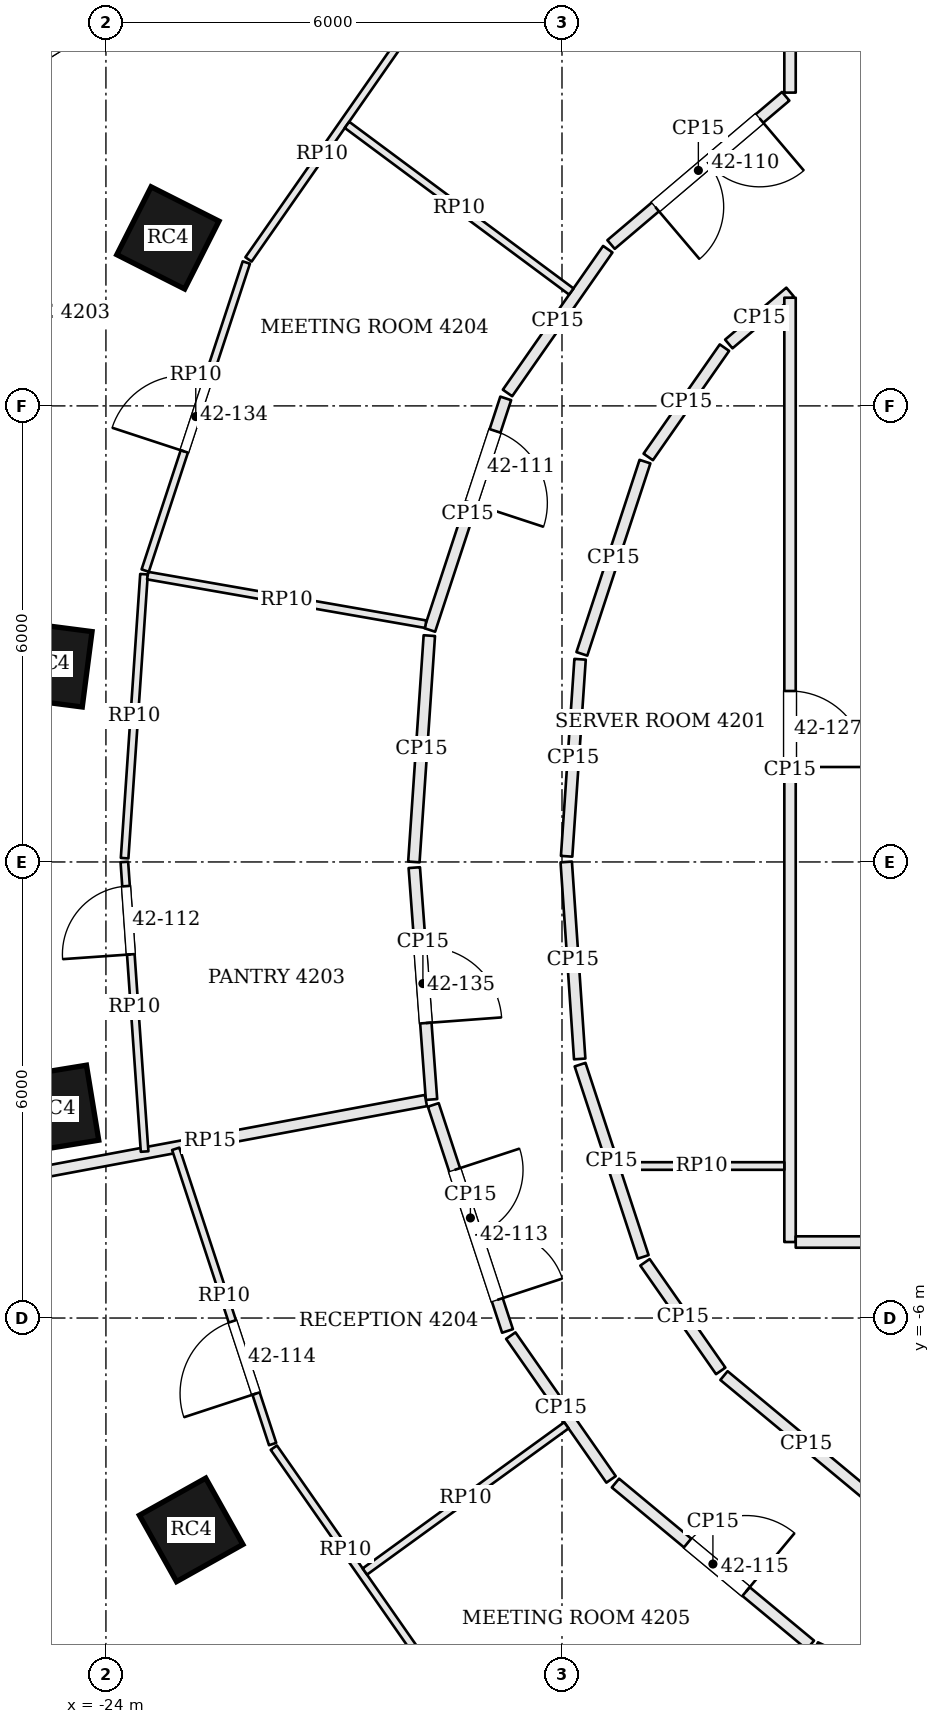
"""IFC4 building model, lengths in metres.
Left out: names, types, materials, properties, quantities, classifications, styles, units other than length and angle.
Written with IfcOpenShell. Run it as: python <this file> out.ifc"""

import sys

from ifc_helpers import new_model, si_unit, direction, frame, frame_2d, origin, origin_2d, place, context, subcontext, project, spatial, rectangle, extrude, element, fill, save


model = new_model("IFC4")
c1 = context("Model", 3, precision=1e-05, world=origin(), true_north=direction((0.0, 1.0)))
c2 = subcontext(c1, "Body", "Model", "MODEL_VIEW")
j1 = project(units=[si_unit("LENGTHUNIT", "METRE"), si_unit("PLANEANGLEUNIT", "RADIAN")], contexts=[c1])
p1 = place(None, origin())
s1 = spatial("IfcSite", under=j1, at=p1, CompositionType="ELEMENT")
p2 = place(p1, origin())
s2 = spatial("IfcBuilding", under=s1, at=p2, CompositionType="ELEMENT")
p3 = place(p2, frame((0.0, 0.0, 174.0)))
s3 = spatial("IfcBuildingStorey", under=s2, at=p3, CompositionType="ELEMENT", Elevation=174.0)
for number, where, z_axis, x_axis in (
    (1, (-23.185, 8.21, -0.7), (0.0, 0.0, 1.0), (-0.451, -0.893, 0.0)),
    (2, (-24.743, 2.599, -0.7), (0.0, 0.0, 1.0), (-0.128, -0.992, 0.0)),
    (3, (-24.669, -3.248, -0.7), (0.0, 0.0, 1.0), (0.162, -0.987, 0.0)),
    (4, (-22.879, -8.787, -0.7), (0.0, 0.0, 1.0), (0.489, -0.873, 0.0)),
):
    element("IfcColumn", number, at=place(p3, frame(where, z_axis=z_axis, x_axis=x_axis)), inside=s3, PredefinedType="COLUMN", context=c2, shape_type="SweptSolid", body=[
        extrude(rectangle(XDim=1.0, YDim=1.0, at=origin_2d()), origin(), (0.0, 0.0, 1.0), 4.6),
    ])
p4 = place(p3, frame((-23.368, 11.701, 0.0), z_axis=(0.0, 0.0, 1.0), x_axis=(-0.850251408633, -0.526376806211, 0.0)))
e5 = element("IfcWall", 5, at=p4, inside=s3, PredefinedType="SOLIDWALL", context=c2, shape_type="SweptSolid", body=[
    extrude(rectangle(XDim=5.302, YDim=0.45, at=frame_2d((2.651, 0.0))), origin(), (0.0, 0.0, 1.0), 3.7),
])
p5 = place(p4, frame((1.601, 0.0, 0.9)))
e6 = element("IfcOpeningElement", 6, at=p5, cuts=e5, PredefinedType="OPENING", context=c2, shape_type="SweptSolid", body=[
    extrude(rectangle(XDim=2.1, YDim=2.3, at=frame_2d((1.05, 1.15))), frame((0.0, 0.235, 0.0), z_axis=(0.0, -1.0, 0.0), x_axis=(1.0, 0.0, 0.0)), (0.0, 0.0, 1.0), 0.47),
])
p6 = place(p3, frame((-15.0, 13.099, 0.0), z_axis=(0.0, 0.0, 1.0), x_axis=(0.0, -1.0, 0.0)))
e7 = element("IfcWall", 7, at=p6, inside=s3, PredefinedType="PARTITIONING", context=c2, shape_type="SweptSolid", body=[
    extrude(rectangle(XDim=2.977, YDim=0.15, at=frame_2d((1.489, 0.0))), origin(), (0.0, 0.0, 1.0), 3.084),
])
p7 = place(p3, frame((-15.057, 10.073, 0.0), z_axis=(0.0, 0.0, 1.0), x_axis=(-0.762398905861, -0.647107339119, 0.0)))
e8 = element("IfcWall", 8, at=p7, inside=s3, PredefinedType="PARTITIONING", context=c2, shape_type="SweptSolid", body=[
    extrude(rectangle(XDim=3.013, YDim=0.15, at=frame_2d((1.507, 0.0))), origin(), (0.0, 0.0, 1.0), 3.084),
])
p8 = place(p7, frame((0.45, 0.0, 0.0)))
e9 = element("IfcOpeningElement", 9, at=p8, cuts=e8, PredefinedType="OPENING", context=c2, shape_type="SweptSolid", body=[
    extrude(rectangle(XDim=1.8, YDim=2.1, at=frame_2d((0.9, 1.05))), frame((0.0, 0.085, 0.0), z_axis=(0.0, -1.0, 0.0), x_axis=(1.0, 0.0, 0.0)), (0.0, 0.0, 1.0), 0.17),
])
p9 = place(p3, frame((-17.397, 8.062, 0.0), z_axis=(0.0, 0.0, 1.0), x_axis=(-0.572118665737, -0.820170855563, 0.0)))
e10 = element("IfcWall", 10, at=p9, inside=s3, PredefinedType="PARTITIONING", context=c2, shape_type="SweptSolid", body=[
    extrude(rectangle(XDim=2.306, YDim=0.15, at=frame_2d((1.153, 0.0))), origin(), (0.0, 0.0, 1.0), 3.084),
])
p10 = place(p3, frame((-18.74, 6.099, 0.0), z_axis=(0.0, 0.0, 1.0), x_axis=(-0.31188427026, -0.950120098706, 0.0)))
e11 = element("IfcWall", 11, at=p10, inside=s3, PredefinedType="PARTITIONING", context=c2, shape_type="SweptSolid", body=[
    extrude(rectangle(XDim=3.206, YDim=0.15, at=frame_2d((1.603, 0.0))), origin(), (0.0, 0.0, 1.0), 3.084),
])
p11 = place(p10, frame((0.45, 0.0, 0.0)))
e12 = element("IfcOpeningElement", 12, at=p11, cuts=e11, PredefinedType="OPENING", context=c2, shape_type="SweptSolid", body=[
    extrude(rectangle(XDim=1.0, YDim=2.4, at=frame_2d((0.5, 1.2))), frame((0.0, 0.085, 0.0), z_axis=(0.0, -1.0, 0.0), x_axis=(1.0, 0.0, 0.0)), (0.0, 0.0, 1.0), 0.17),
])
p12 = place(p3, frame((-19.745, 2.978, 0.0), z_axis=(0.0, 0.0, 1.0), x_axis=(-0.068142324, -0.997675610447, 0.0)))
e13 = element("IfcWall", 13, at=p12, inside=s3, PredefinedType="PARTITIONING", context=c2, shape_type="SweptSolid", body=[
    extrude(rectangle(XDim=2.984, YDim=0.15, at=frame_2d((1.492, 0.0))), origin(), (0.0, 0.0, 1.0), 3.084),
])
p13 = place(p3, frame((-19.943, -0.075, 0.0), z_axis=(0.0, 0.0, 1.0), x_axis=(0.074071611523, -0.997252924973, 0.0)))
e14 = element("IfcWall", 14, at=p13, inside=s3, PredefinedType="PARTITIONING", context=c2, shape_type="SweptSolid", body=[
    extrude(rectangle(XDim=3.059, YDim=0.15, at=frame_2d((1.529, 0.0))), origin(), (0.0, 0.0, 1.0), 3.084),
])
p14 = place(p13, frame((1.05, 0.0, 0.0)))
e15 = element("IfcOpeningElement", 15, at=p14, cuts=e14, PredefinedType="OPENING", context=c2, shape_type="SweptSolid", body=[
    extrude(rectangle(XDim=1.0, YDim=2.1, at=frame_2d((0.5, 1.05))), frame((0.0, 0.085, 0.0), z_axis=(0.0, -1.0, 0.0), x_axis=(1.0, 0.0, 0.0)), (0.0, 0.0, 1.0), 0.17),
])
p15 = place(p3, frame((-25.467, -4.199, 0.0), z_axis=(0.0, 0.0, 1.0), x_axis=(0.982998787258, 0.183612048216, 0.0)))
e16 = element("IfcWall", 16, at=p15, inside=s3, PredefinedType="PARTITIONING", context=c2, shape_type="SweptSolid", body=[
    extrude(rectangle(XDim=5.775, YDim=0.15, at=frame_2d((2.887, 0.0))), origin(), (0.0, 0.0, 1.0), 3.234),
])
p16 = place(p3, frame((-19.693, -3.196, 0.0), z_axis=(0.0, 0.0, 1.0), x_axis=(0.311918951318, -0.950108713679, 0.0)))
e17 = element("IfcWall", 17, at=p16, inside=s3, PredefinedType="PARTITIONING", context=c2, shape_type="SweptSolid", body=[
    extrude(rectangle(XDim=3.13, YDim=0.15, at=frame_2d((1.565, 0.0))), origin(), (0.0, 0.0, 1.0), 3.084),
])
p17 = place(p16, frame((0.9, 0.0, 0.0)))
e18 = element("IfcOpeningElement", 18, at=p17, cuts=e17, PredefinedType="OPENING", context=c2, shape_type="SweptSolid", body=[
    extrude(rectangle(XDim=1.8, YDim=2.1, at=frame_2d((0.9, 1.05))), frame((0.0, 0.085, 0.0), z_axis=(0.0, -1.0, 0.0), x_axis=(1.0, 0.0, 0.0)), (0.0, 0.0, 1.0), 0.17),
])
p18 = place(p3, frame((-18.674, -6.232, 0.0), z_axis=(0.0, 0.0, 1.0), x_axis=(0.572118665737, -0.820170855563, 0.0)))
e19 = element("IfcWall", 19, at=p18, inside=s3, PredefinedType="PARTITIONING", context=c2, shape_type="SweptSolid", body=[
    extrude(rectangle(XDim=2.306, YDim=0.15, at=frame_2d((1.153, 0.0))), origin(), (0.0, 0.0, 1.0), 3.084),
])
p19 = place(p3, frame((-17.297, -8.171, 0.0), z_axis=(0.0, 0.0, 1.0), x_axis=(0.769228575061, -0.638973707839, 0.0)))
e20 = element("IfcWall", 20, at=p19, inside=s3, PredefinedType="PARTITIONING", context=c2, shape_type="SweptSolid", body=[
    extrude(rectangle(XDim=3.334, YDim=0.15, at=frame_2d((1.667, 0.0))), origin(), (0.0, 0.0, 1.0), 3.084),
])
p20 = place(p19, frame((1.234, 0.0, 0.0)))
e21 = element("IfcOpeningElement", 21, at=p20, cuts=e20, PredefinedType="OPENING", context=c2, shape_type="SweptSolid", body=[
    extrude(rectangle(XDim=1.0, YDim=2.4, at=frame_2d((0.5, 1.2))), frame((0.0, 0.085, 0.0), z_axis=(0.0, -1.0, 0.0), x_axis=(1.0, 0.0, 0.0)), (0.0, 0.0, 1.0), 0.17),
])
p21 = place(p3, frame((-14.664, -10.334, 0.0), z_axis=(0.0, 0.0, 1.0), x_axis=(0.901507315282, -0.432763862278, 0.0)))
e22 = element("IfcWall", 22, at=p21, inside=s3, PredefinedType="PARTITIONING", context=c2, shape_type="SweptSolid", body=[
    extrude(rectangle(XDim=3.63, YDim=0.15, at=frame_2d((1.815, 0.0))), origin(), (0.0, 0.0, 1.0), 3.084),
])
p22 = place(p21, frame((1.85, 0.0, 0.0)))
e23 = element("IfcOpeningElement", 23, at=p22, cuts=e22, PredefinedType="OPENING", context=c2, shape_type="SweptSolid", body=[
    extrude(rectangle(XDim=0.9, YDim=2.1, at=frame_2d((0.45, 1.05))), frame((0.0, 0.085, 0.0), z_axis=(0.0, -1.0, 0.0), x_axis=(1.0, 0.0, 0.0)), (0.0, 0.0, 1.0), 0.17),
])
p23 = place(p3, frame((-13.702, -8.557, 0.0), z_axis=(0.0, 0.0, 1.0), x_axis=(-0.769221825067, 0.638981833733, 0.0)))
e24 = element("IfcWall", 24, at=p23, inside=s3, PredefinedType="PARTITIONING", context=c2, shape_type="SweptSolid", body=[
    extrude(rectangle(XDim=2.817, YDim=0.15, at=frame_2d((1.409, 0.0))), origin(), (0.0, 0.0, 1.0), 3.084),
])
p24 = place(p3, frame((-15.912, -6.696, 0.0), z_axis=(0.0, 0.0, 1.0), x_axis=(-0.572078533763, 0.820198848578, 0.0)))
e25 = element("IfcWall", 25, at=p24, inside=s3, PredefinedType="PARTITIONING", context=c2, shape_type="SweptSolid", body=[
    extrude(rectangle(XDim=1.742, YDim=0.15, at=frame_2d((0.871, 0.0))), origin(), (0.0, 0.0, 1.0), 3.084),
])
p25 = place(p3, frame((-16.932, -5.196, 0.0), z_axis=(0.0, 0.0, 1.0), x_axis=(-0.311904957484, 0.950113307715, 0.0)))
e26 = element("IfcWall", 26, at=p25, inside=s3, PredefinedType="PARTITIONING", context=c2, shape_type="SweptSolid", body=[
    extrude(rectangle(XDim=2.662, YDim=0.15, at=frame_2d((1.331, 0.0))), origin(), (0.0, 0.0, 1.0), 3.084),
])
p26 = place(p3, frame((-17.767, -2.592, 0.0), z_axis=(0.0, 0.0, 1.0), x_axis=(-0.068140828228, 0.997675712608, 0.0)))
e27 = element("IfcWall", 27, at=p26, inside=s3, PredefinedType="PARTITIONING", context=c2, shape_type="SweptSolid", body=[
    extrude(rectangle(XDim=2.598, YDim=0.15, at=frame_2d((1.299, 0.0))), origin(), (0.0, 0.0, 1.0), 3.084),
])
p27 = place(p3, frame((-17.939, 0.075, 0.0), z_axis=(0.0, 0.0, 1.0), x_axis=(0.068227980697, 0.997669756307, 0.0)))
e28 = element("IfcWall", 28, at=p27, inside=s3, PredefinedType="PARTITIONING", context=c2, shape_type="SweptSolid", body=[
    extrude(rectangle(XDim=2.598, YDim=0.15, at=frame_2d((1.299, 0.0))), origin(), (0.0, 0.0, 1.0), 3.084),
])
p28 = place(p3, frame((-17.739, 2.738, 0.0), z_axis=(0.0, 0.0, 1.0), x_axis=(0.311904957484, 0.950113307715, 0.0)))
e29 = element("IfcWall", 29, at=p28, inside=s3, PredefinedType="PARTITIONING", context=c2, shape_type="SweptSolid", body=[
    extrude(rectangle(XDim=2.662, YDim=0.15, at=frame_2d((1.331, 0.0))), origin(), (0.0, 0.0, 1.0), 3.084),
])
p29 = place(p3, frame((-16.865, 5.329, 0.0), z_axis=(0.0, 0.0, 1.0), x_axis=(0.572096615639, 0.820186236397, 0.0)))
e30 = element("IfcWall", 30, at=p29, inside=s3, PredefinedType="PARTITIONING", context=c2, shape_type="SweptSolid", body=[
    extrude(rectangle(XDim=1.753, YDim=0.15, at=frame_2d((0.876, 0.0))), origin(), (0.0, 0.0, 1.0), 3.084),
])
p30 = place(p3, frame((-15.805, 6.814, 0.0), z_axis=(0.0, 0.0, 1.0), x_axis=(0.762298381233, 0.647225755027, 0.0)))
e31 = element("IfcWall", 31, at=p30, inside=s3, PredefinedType="PARTITIONING", context=c2, shape_type="SweptSolid", body=[
    extrude(rectangle(XDim=1.057, YDim=0.15, at=frame_2d((0.528, 0.0))), origin(), (0.0, 0.0, 1.0), 3.084),
])
p31 = place(p3, frame((-15.0, 7.423, 0.0), z_axis=(0.0, 0.0, 1.0), x_axis=(0.0, -1.0, 0.0)))
e32 = element("IfcWall", 32, at=p31, inside=s3, PredefinedType="PARTITIONING", context=c2, shape_type="SweptSolid", body=[
    extrude(rectangle(XDim=12.423, YDim=0.15, at=frame_2d((6.211, 0.0))), origin(), (0.0, 0.0, 1.0), 3.084),
])
p32 = place(p31, frame((5.174, 0.0, 0.0)))
e33 = element("IfcOpeningElement", 33, at=p32, cuts=e32, PredefinedType="OPENING", context=c2, shape_type="SweptSolid", body=[
    extrude(rectangle(XDim=1.0, YDim=2.1, at=frame_2d((0.5, 1.05))), frame((0.0, 0.085, 0.0), z_axis=(0.0, -1.0, 0.0), x_axis=(1.0, 0.0, 0.0)), (0.0, 0.0, 1.0), 0.17),
])
p33 = place(p3, frame((-14.925, -5.0, 0.0), z_axis=(0.0, 0.0, 1.0), x_axis=(1.0, 0.0, 0.0)))
e34 = element("IfcWall", 34, at=p33, inside=s3, PredefinedType="PARTITIONING", context=c2, shape_type="SweptSolid", body=[
    extrude(rectangle(XDim=29.925, YDim=0.15, at=frame_2d((14.962, 0.0))), origin(), (0.0, 0.0, 1.0), 3.084),
])
p34 = place(p33, frame((2.175, 0.0, 0.0)))
e35 = element("IfcOpeningElement", 35, at=p34, cuts=e34, PredefinedType="OPENING", context=c2, shape_type="SweptSolid", body=[
    extrude(rectangle(XDim=1.0, YDim=2.1, at=frame_2d((0.5, 1.05))), frame((0.0, 0.085, 0.0), z_axis=(0.0, -1.0, 0.0), x_axis=(1.0, 0.0, 0.0)), (0.0, 0.0, 1.0), 0.17),
])
p35 = place(p33, frame((14.025, 0.0, 0.0)))
e36 = element("IfcOpeningElement", 36, at=p35, cuts=e34, PredefinedType="OPENING", context=c2, shape_type="SweptSolid", body=[
    extrude(rectangle(XDim=1.8, YDim=2.1, at=frame_2d((0.9, 1.05))), frame((0.0, 0.085, 0.0), z_axis=(0.0, -1.0, 0.0), x_axis=(1.0, 0.0, 0.0)), (0.0, 0.0, 1.0), 0.17),
])
p36 = place(p33, frame((26.675, 0.0, 0.0)))
e37 = element("IfcOpeningElement", 37, at=p36, cuts=e34, PredefinedType="OPENING", context=c2, shape_type="SweptSolid", body=[
    extrude(rectangle(XDim=1.0, YDim=2.1, at=frame_2d((0.5, 1.05))), frame((0.0, 0.085, 0.0), z_axis=(0.0, -1.0, 0.0), x_axis=(1.0, 0.0, 0.0)), (0.0, 0.0, 1.0), 0.17),
])
p37 = place(p3, frame((-23.491, -3.81, 0.0), z_axis=(0.0, 0.0, 1.0), x_axis=(-0.069811314636, 0.997560213896, 0.0)))
e38 = element("IfcWall", 38, at=p37, inside=s3, PredefinedType="PARTITIONING", context=c2, shape_type="SweptSolid", body=[
    extrude(rectangle(XDim=3.819, YDim=0.1, at=frame_2d((1.909, 0.0))), origin(), (0.0, 0.0, 1.0), 3.084),
])
p38 = place(p37, frame((2.6, 0.0, 0.0)))
e39 = element("IfcOpeningElement", 39, at=p38, cuts=e38, PredefinedType="OPENING", context=c2, shape_type="SweptSolid", body=[
    extrude(rectangle(XDim=0.9, YDim=2.1, at=frame_2d((0.45, 1.05))), frame((0.0, 0.06, 0.0), z_axis=(0.0, -1.0, 0.0), x_axis=(1.0, 0.0, 0.0)), (0.0, 0.0, 1.0), 0.12),
])
p39 = place(p3, frame((-23.754, 0.05, 0.0), z_axis=(0.0, 0.0, 1.0), x_axis=(0.068193493527, 0.997672114194, 0.0)))
e40 = element("IfcWall", 40, at=p39, inside=s3, PredefinedType="PARTITIONING", context=c2, shape_type="SweptSolid", body=[
    extrude(rectangle(XDim=3.745, YDim=0.1, at=frame_2d((1.873, 0.0))), origin(), (0.0, 0.0, 1.0), 3.084),
])
p40 = place(p3, frame((-23.483, 3.833, 0.0), z_axis=(0.0, 0.0, 1.0), x_axis=(0.311880220566, 0.95012142804, 0.0)))
e41 = element("IfcWall", 41, at=p40, inside=s3, PredefinedType="PARTITIONING", context=c2, shape_type="SweptSolid", body=[
    extrude(rectangle(XDim=4.265, YDim=0.1, at=frame_2d((2.133, 0.0))), origin(), (0.0, 0.0, 1.0), 3.084),
])
p41 = place(p40, frame((1.65, 0.0, 0.0)))
e42 = element("IfcOpeningElement", 42, at=p41, cuts=e41, PredefinedType="OPENING", context=c2, shape_type="SweptSolid", body=[
    extrude(rectangle(XDim=1.0, YDim=2.4, at=frame_2d((0.5, 1.2))), frame((0.0, 0.06, 0.0), z_axis=(0.0, -1.0, 0.0), x_axis=(1.0, 0.0, 0.0)), (0.0, 0.0, 1.0), 0.12),
])
p42 = place(p3, frame((-22.125, 7.927, 0.0), z_axis=(0.0, 0.0, 1.0), x_axis=(0.572100301866, 0.820183665166, 0.0)))
e43 = element("IfcWall", 43, at=p42, inside=s3, PredefinedType="PARTITIONING", context=c2, shape_type="SweptSolid", body=[
    extrude(rectangle(XDim=3.382, YDim=0.1, at=frame_2d((1.691, 0.0))), origin(), (0.0, 0.0, 1.0), 3.084),
])
p43 = place(p3, frame((-17.877, 7.505, 0.0), z_axis=(0.0, 0.0, 1.0), x_axis=(-0.802692989486, 0.596392458563, 0.0)))
e44 = element("IfcWall", 44, at=p43, inside=s3, PredefinedType="PARTITIONING", context=c2, shape_type="SweptSolid", body=[
    extrude(rectangle(XDim=3.677, YDim=0.1, at=frame_2d((1.838, 0.0))), origin(), (0.0, 0.0, 1.0), 3.084),
])
p44 = place(p3, frame((-19.794, 3.128, 0.0), z_axis=(0.0, 0.0, 1.0), x_axis=(-0.985065623684, 0.172179316518, 0.0)))
e45 = element("IfcWall", 45, at=p44, inside=s3, PredefinedType="PARTITIONING", context=c2, shape_type="SweptSolid", body=[
    extrude(rectangle(XDim=3.712, YDim=0.1, at=frame_2d((1.856, 0.0))), origin(), (0.0, 0.0, 1.0), 3.084),
])
p45 = place(p3, frame((-19.909, -10.404, 0.0), z_axis=(0.0, 0.0, 1.0), x_axis=(-0.572111951901, 0.820175538828, 0.0)))
e46 = element("IfcWall", 46, at=p45, inside=s3, PredefinedType="PARTITIONING", context=c2, shape_type="SweptSolid", body=[
    extrude(rectangle(XDim=3.29, YDim=0.1, at=frame_2d((1.645, 0.0))), origin(), (0.0, 0.0, 1.0), 3.084),
])
p46 = place(p3, frame((-21.807, -7.658, 0.0), z_axis=(0.0, 0.0, 1.0), x_axis=(-0.311924580949, 0.950106865463, 0.0)))
e47 = element("IfcWall", 47, at=p46, inside=s3, PredefinedType="PARTITIONING", context=c2, shape_type="SweptSolid", body=[
    extrude(rectangle(XDim=4.088, YDim=0.1, at=frame_2d((2.044, 0.0))), origin(), (0.0, 0.0, 1.0), 3.084),
])
p47 = place(p46, frame((0.699, 0.0, 0.0)))
e48 = element("IfcOpeningElement", 48, at=p47, cuts=e47, PredefinedType="OPENING", context=c2, shape_type="SweptSolid", body=[
    extrude(rectangle(XDim=1.0, YDim=2.1, at=frame_2d((0.5, 1.05))), frame((0.0, 0.06, 0.0), z_axis=(0.0, -1.0, 0.0), x_axis=(1.0, 0.0, 0.0)), (0.0, 0.0, 1.0), 0.12),
])
p48 = place(p3, frame((-17.942, -7.412, 0.0), z_axis=(0.0, 0.0, 1.0), x_axis=(-0.809425321456, -0.587222827372, 0.0)))
e49 = element("IfcWall", 49, at=p48, inside=s3, PredefinedType="PARTITIONING", context=c2, shape_type="SweptSolid", body=[
    extrude(rectangle(XDim=3.275, YDim=0.1, at=frame_2d((1.638, 0.0))), origin(), (0.0, 0.0, 1.0), 3.084),
])
p49 = place(p3, frame((-17.249, -4.0, 0.0), z_axis=(0.0, 0.0, 1.0), x_axis=(1.0, 0.0, 0.0)))
e50 = element("IfcWall", 50, at=p49, inside=s3, PredefinedType="PARTITIONING", context=c2, shape_type="SweptSolid", body=[
    extrude(rectangle(XDim=2.174, YDim=0.1, at=frame_2d((1.087, 0.0))), origin(), (0.0, 0.0, 1.0), 3.084),
])
p50 = place(p5, origin())
e51 = element("IfcWindow", 51, at=p50, inside=s3, PartitioningType="SINGLE_PANEL", PredefinedType="WINDOW", context=c2, shape_type="SweptSolid", body=[
    extrude(rectangle(XDim=2.1, YDim=2.3, at=frame_2d((1.05, 1.15))), frame((0.0, 0.135, 0.0), z_axis=(0.0, -1.0, 0.0), x_axis=(1.0, 0.0, 0.0)), (0.0, 0.0, 1.0), 0.06),
])
fill(e6, e51)
p51 = place(p8, origin())
e52 = element("IfcDoor", 52, at=p51, inside=s3, OperationType="DOUBLE_DOOR_SINGLE_SWING", PredefinedType="DOOR", context=c2, shape_type="SweptSolid", body=[
    extrude(rectangle(XDim=1.8, YDim=2.1, at=frame_2d((0.9, 1.05))), frame((0.0, 0.025, 0.0), z_axis=(0.0, -1.0, 0.0), x_axis=(1.0, 0.0, 0.0)), (0.0, 0.0, 1.0), 0.05),
])
fill(e9, e52)
p52 = place(p11, origin())
e53 = element("IfcDoor", 53, at=p52, inside=s3, OperationType="SINGLE_SWING_RIGHT", PredefinedType="DOOR", context=c2, shape_type="SweptSolid", body=[
    extrude(rectangle(XDim=1.0, YDim=2.4, at=frame_2d((0.5, 1.2))), frame((0.0, 0.025, 0.0), z_axis=(0.0, -1.0, 0.0), x_axis=(1.0, 0.0, 0.0)), (0.0, 0.0, 1.0), 0.05),
])
fill(e12, e53)
p53 = place(p38, origin())
e54 = element("IfcDoor", 54, at=p53, inside=s3, OperationType="SINGLE_SWING_LEFT", PredefinedType="DOOR", context=c2, shape_type="SweptSolid", body=[
    extrude(rectangle(XDim=0.9, YDim=2.1, at=frame_2d((0.45, 1.05))), frame((0.0, 0.025, 0.0), z_axis=(0.0, -1.0, 0.0), x_axis=(1.0, 0.0, 0.0)), (0.0, 0.0, 1.0), 0.05),
])
fill(e39, e54)
p54 = place(p17, origin())
e55 = element("IfcDoor", 55, at=p54, inside=s3, OperationType="DOUBLE_DOOR_SINGLE_SWING", PredefinedType="DOOR", context=c2, shape_type="SweptSolid", body=[
    extrude(rectangle(XDim=1.8, YDim=2.1, at=frame_2d((0.9, 1.05))), frame((0.0, 0.025, 0.0), z_axis=(0.0, -1.0, 0.0), x_axis=(1.0, 0.0, 0.0)), (0.0, 0.0, 1.0), 0.05),
])
fill(e18, e55)
p55 = place(p47, origin())
e56 = element("IfcDoor", 56, at=p55, inside=s3, OperationType="SINGLE_SWING_LEFT", PredefinedType="DOOR", context=c2, shape_type="SweptSolid", body=[
    extrude(rectangle(XDim=1.0, YDim=2.1, at=frame_2d((0.5, 1.05))), frame((0.0, 0.025, 0.0), z_axis=(0.0, -1.0, 0.0), x_axis=(1.0, 0.0, 0.0)), (0.0, 0.0, 1.0), 0.05),
])
fill(e48, e56)
p56 = place(p20, origin())
e57 = element("IfcDoor", 57, at=p56, inside=s3, OperationType="SINGLE_SWING_RIGHT", PredefinedType="DOOR", context=c2, shape_type="SweptSolid", body=[
    extrude(rectangle(XDim=1.0, YDim=2.4, at=frame_2d((0.5, 1.2))), frame((0.0, 0.025, 0.0), z_axis=(0.0, -1.0, 0.0), x_axis=(1.0, 0.0, 0.0)), (0.0, 0.0, 1.0), 0.05),
])
fill(e21, e57)
p57 = place(p32, origin())
e58 = element("IfcDoor", 58, at=p57, inside=s3, OperationType="SINGLE_SWING_RIGHT", PredefinedType="DOOR", context=c2, shape_type="SweptSolid", body=[
    extrude(rectangle(XDim=1.0, YDim=2.1, at=frame_2d((0.5, 1.05))), frame((0.0, 0.025, 0.0), z_axis=(0.0, -1.0, 0.0), x_axis=(1.0, 0.0, 0.0)), (0.0, 0.0, 1.0), 0.05),
])
fill(e33, e58)
p58 = place(p41, origin())
e59 = element("IfcDoor", 59, at=p58, inside=s3, OperationType="SINGLE_SWING_LEFT", PredefinedType="DOOR", context=c2, shape_type="SweptSolid", body=[
    extrude(rectangle(XDim=1.0, YDim=2.4, at=frame_2d((0.5, 1.2))), frame((0.0, 0.025, 0.0), z_axis=(0.0, -1.0, 0.0), x_axis=(1.0, 0.0, 0.0)), (0.0, 0.0, 1.0), 0.05),
])
fill(e42, e59)
p59 = place(p14, origin())
e60 = element("IfcDoor", 60, at=p59, inside=s3, OperationType="SINGLE_SWING_RIGHT", PredefinedType="DOOR", context=c2, shape_type="SweptSolid", body=[
    extrude(rectangle(XDim=1.0, YDim=2.1, at=frame_2d((0.5, 1.05))), frame((0.0, 0.025, 0.0), z_axis=(0.0, -1.0, 0.0), x_axis=(1.0, 0.0, 0.0)), (0.0, 0.0, 1.0), 0.05),
])
fill(e15, e60)
save(model, sys.argv[1])
